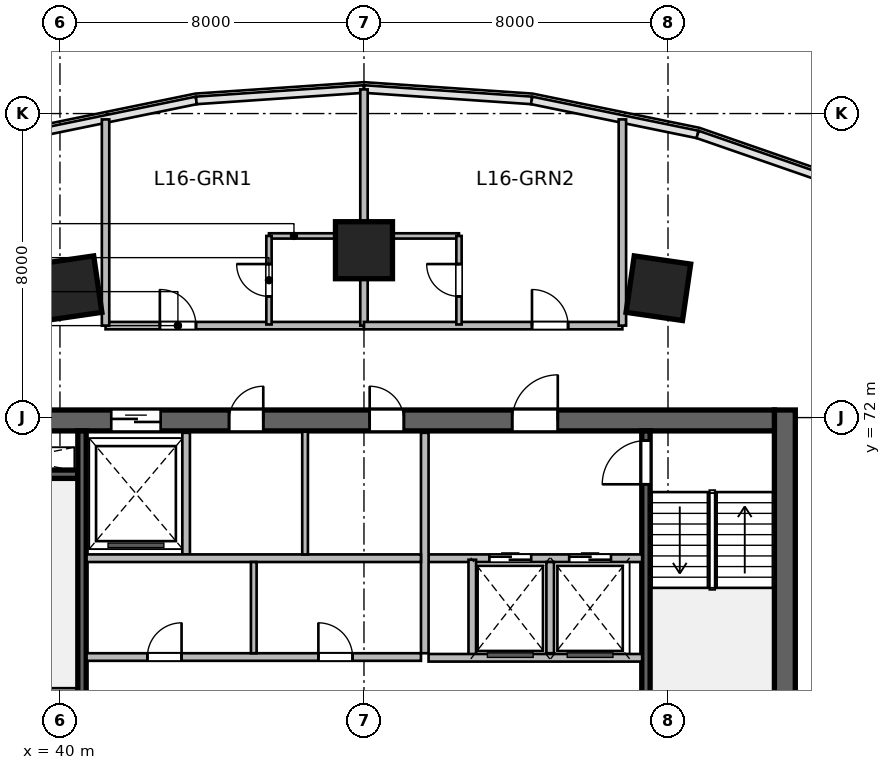
"""IFC4 building model, lengths in metres.
Left out: names, types, materials, properties, quantities, classifications, styles, units other than length and angle.
Written with IfcOpenShell. Run it as: python <this file> out.ifc"""

import sys

from ifc_helpers import new_model, si_unit, direction, frame, frame_2d, origin, origin_2d, place, context, subcontext, project, spatial, rectangle, extrude, source, transform, mapped, element, fill, save


model = new_model("IFC4")
c1 = context("Model", 3, precision=1e-05, world=origin(), true_north=direction((0.0, 1.0)))
c2 = subcontext(c1, "Body", "Model", "MODEL_VIEW")
j1 = project(units=[si_unit("LENGTHUNIT", "METRE"), si_unit("PLANEANGLEUNIT", "RADIAN")], contexts=[c1])
p1 = place(None, origin())
s1 = spatial("IfcSite", under=j1, at=p1, CompositionType="ELEMENT")
p2 = place(p1, origin())
s2 = spatial("IfcBuilding", under=s1, at=p2, CompositionType="ELEMENT")
p3 = place(p2, frame((0.0, 0.0, 71.4)))
s3 = spatial("IfcBuildingStorey", under=s2, at=p3, CompositionType="ELEMENT", Elevation=71.4)
m1 = source(origin(), c2, "Body", "SweptSolid", [
    extrude(rectangle(XDim=12.0, YDim=0.55, at=frame_2d((6.0, 0.0))), origin(), (0.0, 0.0, 1.0), 3.6),
])
p4 = place(p3, frame((59.075, 60.2, 0.0), z_axis=(0.0, 0.0, 1.0), x_axis=(0.0, 1.0, 0.0)))
e1 = element("IfcWall", 1, at=p4, inside=s3, PredefinedType="SHEAR", context=c2, shape_type="MappedRepresentation", body=[
    mapped(m1, transform((0.0, 0.0, 0.0), scale=1.0)),
])
m2 = source(origin(), c2, "Body", "SweptSolid", [
    extrude(rectangle(XDim=21.6, YDim=0.55, at=frame_2d((10.8, 0.0))), origin(), (0.0, 0.0, 1.0), 3.6),
])
p5 = place(p3, frame((37.2, 71.925, 0.0), z_axis=(0.0, 0.0, 1.0), x_axis=(1.0, 0.0, 0.0)))
e2 = element("IfcWall", 2, at=p5, inside=s3, PredefinedType="SHEAR", context=c2, shape_type="MappedRepresentation", body=[
    mapped(m2, transform((0.0, 0.0, 0.0), scale=1.0)),
])
p6 = place(p5, frame((1.2, 0.0, 0.0)))
e3 = element("IfcOpeningElement", 3, at=p6, cuts=e2, PredefinedType="OPENING", context=c2, shape_type="SweptSolid", body=[
    extrude(rectangle(XDim=0.9, YDim=2.1, at=frame_2d((0.45, 1.05))), frame((0.0, 0.285, 0.0), z_axis=(0.0, -1.0, 0.0), x_axis=(1.0, 0.0, 0.0)), (0.0, 0.0, 1.0), 0.57),
])
p7 = place(p5, frame((14.7, 0.0, 0.0)))
e4 = element("IfcOpeningElement", 4, at=p7, cuts=e2, PredefinedType="OPENING", context=c2, shape_type="SweptSolid", body=[
    extrude(rectangle(XDim=1.2, YDim=2.15, at=frame_2d((0.6, 1.075))), frame((0.0, 0.285, 0.0), z_axis=(0.0, -1.0, 0.0), x_axis=(1.0, 0.0, 0.0)), (0.0, 0.0, 1.0), 0.57),
])
p8 = place(p5, frame((4.15, 0.0, 0.0)))
e5 = element("IfcOpeningElement", 5, at=p8, cuts=e2, PredefinedType="OPENING", context=c2, shape_type="SweptSolid", body=[
    extrude(rectangle(XDim=1.3, YDim=2.15, at=frame_2d((0.65, 1.075))), frame((0.0, 0.285, 0.0), z_axis=(0.0, -1.0, 0.0), x_axis=(1.0, 0.0, 0.0)), (0.0, 0.0, 1.0), 0.57),
])
p9 = place(p5, frame((7.25, 0.0, 0.0)))
e6 = element("IfcOpeningElement", 6, at=p9, cuts=e2, PredefinedType="OPENING", context=c2, shape_type="SweptSolid", body=[
    extrude(rectangle(XDim=0.9, YDim=2.1, at=frame_2d((0.45, 1.05))), frame((0.0, 0.285, 0.0), z_axis=(0.0, -1.0, 0.0), x_axis=(1.0, 0.0, 0.0)), (0.0, 0.0, 1.0), 0.57),
])
p10 = place(p5, frame((10.95, 0.0, 0.0)))
e7 = element("IfcOpeningElement", 7, at=p10, cuts=e2, PredefinedType="OPENING", context=c2, shape_type="SweptSolid", body=[
    extrude(rectangle(XDim=0.9, YDim=2.1, at=frame_2d((0.45, 1.05))), frame((0.0, 0.285, 0.0), z_axis=(0.0, -1.0, 0.0), x_axis=(1.0, 0.0, 0.0)), (0.0, 0.0, 1.0), 0.57),
])
m3 = source(origin(), c2, "Body", "SweptSolid", [
    extrude(rectangle(XDim=3.27, YDim=0.22, at=frame_2d((1.635, 0.0))), origin(), (0.0, 0.0, 1.0), 3.6),
])
p11 = place(p3, frame((37.2, 70.51, 0.0), z_axis=(0.0, 0.0, 1.0), x_axis=(1.0, 0.0, 0.0)))
e8 = element("IfcWall", 8, at=p11, inside=s3, PredefinedType="SHEAR", context=c2, shape_type="MappedRepresentation", body=[
    mapped(m3, transform((0.0, 0.0, 0.0), scale=1.0)),
])
m4 = source(origin(), c2, "Body", "SweptSolid", [
    extrude(rectangle(XDim=10.9, YDim=0.22, at=frame_2d((5.45, 0.0))), origin(), (0.0, 0.0, 1.0), 3.6),
])
p12 = place(p3, frame((40.58, 60.75, 0.0), z_axis=(0.0, 0.0, 1.0), x_axis=(0.0, 1.0, 0.0)))
e9 = element("IfcWall", 9, at=p12, inside=s3, PredefinedType="SHEAR", context=c2, shape_type="MappedRepresentation", body=[
    mapped(m4, transform((0.0, 0.0, 0.0), scale=1.0)),
])
p13 = place(p3, frame((55.42, 60.75, 0.0), z_axis=(0.0, 0.0, 1.0), x_axis=(0.0, 1.0, 0.0)))
e10 = element("IfcWall", 10, at=p13, inside=s3, PredefinedType="SHEAR", context=c2, shape_type="MappedRepresentation", body=[
    mapped(m4, transform((0.0, 0.0, 0.0), scale=1.0)),
])
p14 = place(p13, frame((9.495, 0.0, 0.0)))
e11 = element("IfcOpeningElement", 11, at=p14, cuts=e10, PredefinedType="OPENING", context=c2, shape_type="SweptSolid", body=[
    extrude(rectangle(XDim=1.15, YDim=2.15, at=frame_2d((0.575, 1.075))), frame((0.0, 0.12, 0.0), z_axis=(0.0, -1.0, 0.0), x_axis=(1.0, 0.0, 0.0)), (0.0, 0.0, 1.0), 0.24),
])
m5 = source(origin(), c2, "Body", "SweptSolid", [
    extrude(rectangle(XDim=1.5, YDim=1.5, at=origin_2d()), origin(), (0.0, 0.0, 1.0), 3.6),
])
for number, where, z_axis, x_axis in (
    (12, (40.253, 75.404, 0.0), (0.0, 0.0, 1.0), (-0.143, 0.99, 0.0)),
    (13, (48.0, 76.404, 0.0), (0.0, 0.0, 1.0), (0.0, 1.0, 0.0)),
    (14, (55.747, 75.404, 0.0), (0.0, 0.0, 1.0), (0.143, 0.99, 0.0)),
):
    element("IfcColumn", number, at=place(p3, frame(where, z_axis=z_axis, x_axis=x_axis)), inside=s3, PredefinedType="COLUMN", context=c2, shape_type="MappedRepresentation", body=[
        mapped(m5, transform((0.0, 0.0, 0.0), scale=1.0)),
    ])
m6 = source(origin(), c2, "Body", "SweptSolid", [
    extrude(rectangle(XDim=5.62, YDim=0.2, at=frame_2d((2.81, 0.0))), origin(), (0.0, 0.0, 1.0), 3.36),
])
p15 = place(p3, frame((49.7, 68.3, 0.0), z_axis=(0.0, 0.0, 1.0), x_axis=(1.0, 0.0, 0.0)))
e15 = element("IfcWall", 15, at=p15, inside=s3, PredefinedType="SOLIDWALL", context=c2, shape_type="MappedRepresentation", body=[
    mapped(m6, transform((0.0, 0.0, 0.0), scale=1.0)),
])
p16 = place(p15, frame((1.6, 0.0, 0.0)))
e16 = element("IfcOpeningElement", 16, at=p16, cuts=e15, PredefinedType="OPENING", context=c2, shape_type="SweptSolid", body=[
    extrude(rectangle(XDim=1.1, YDim=2.15, at=frame_2d((0.55, 1.075))), frame((0.0, 0.11, 0.0), z_axis=(0.0, -1.0, 0.0), x_axis=(1.0, 0.0, 0.0)), (0.0, 0.0, 1.0), 0.22),
])
p17 = place(p15, frame((3.7, 0.0, 0.0)))
e17 = element("IfcOpeningElement", 17, at=p17, cuts=e15, PredefinedType="OPENING", context=c2, shape_type="SweptSolid", body=[
    extrude(rectangle(XDim=1.1, YDim=2.15, at=frame_2d((0.55, 1.075))), frame((0.0, 0.11, 0.0), z_axis=(0.0, -1.0, 0.0), x_axis=(1.0, 0.0, 0.0)), (0.0, 0.0, 1.0), 0.22),
])
m7 = source(origin(), c2, "Body", "SweptSolid", [
    extrude(rectangle(XDim=5.8, YDim=0.2, at=frame_2d((2.9, 0.0))), origin(), (0.0, 0.0, 1.0), 3.36),
])
p18 = place(p3, frame((49.6, 65.8, 0.0), z_axis=(0.0, 0.0, 1.0), x_axis=(0.0, 1.0, 0.0)))
e18 = element("IfcWall", 18, at=p18, inside=s3, PredefinedType="SOLIDWALL", context=c2, shape_type="MappedRepresentation", body=[
    mapped(m7, transform((0.0, 0.0, 0.0), scale=1.0)),
])
m8 = source(origin(), c2, "Body", "SweptSolid", [
    extrude(rectangle(XDim=2.58, YDim=0.2, at=frame_2d((1.29, 0.0))), origin(), (0.0, 0.0, 1.0), 3.36),
])
p19 = place(p3, frame((50.85, 65.68, 0.0), z_axis=(0.0, 0.0, 1.0), x_axis=(0.0, 1.0, 0.0)))
e19 = element("IfcWall", 19, at=p19, inside=s3, PredefinedType="SOLIDWALL", context=c2, shape_type="MappedRepresentation", body=[
    mapped(m8, transform((0.0, 0.0, 0.0), scale=1.0)),
])
m9 = source(origin(), c2, "Body", "SweptSolid", [
    extrude(rectangle(XDim=2.4, YDim=0.2, at=frame_2d((1.2, 0.0))), origin(), (0.0, 0.0, 1.0), 3.36),
])
p20 = place(p3, frame((52.9, 65.8, 0.0), z_axis=(0.0, 0.0, 1.0), x_axis=(0.0, 1.0, 0.0)))
e20 = element("IfcWall", 20, at=p20, inside=s3, PredefinedType="SOLIDWALL", context=c2, shape_type="MappedRepresentation", body=[
    mapped(m9, transform((0.0, 0.0, 0.0), scale=1.0)),
])
p21 = place(p3, frame((49.7, 65.68, 0.0), z_axis=(0.0, 0.0, 1.0), x_axis=(1.0, 0.0, 0.0)))
e21 = element("IfcWall", 21, at=p21, inside=s3, PredefinedType="SOLIDWALL", context=c2, shape_type="MappedRepresentation", body=[
    mapped(m6, transform((0.0, 0.0, 0.0), scale=1.0)),
])
m10 = source(origin(), c2, "Body", "SweptSolid", [
    extrude(rectangle(XDim=3.2, YDim=0.2, at=frame_2d((1.6, 0.0))), origin(), (0.0, 0.0, 1.0), 3.36),
])
p22 = place(p3, frame((43.32, 68.4, 0.0), z_axis=(0.0, 0.0, 1.0), x_axis=(0.0, 1.0, 0.0)))
e22 = element("IfcWall", 22, at=p22, inside=s3, PredefinedType="SOLIDWALL", context=c2, shape_type="MappedRepresentation", body=[
    mapped(m10, transform((0.0, 0.0, 0.0), scale=1.0)),
])
m11 = source(origin(), c2, "Body", "SweptSolid", [
    extrude(rectangle(XDim=8.8, YDim=0.2, at=frame_2d((4.4, 0.0))), origin(), (0.0, 0.0, 1.0), 3.36),
])
p23 = place(p3, frame((40.7, 68.3, 0.0), z_axis=(0.0, 0.0, 1.0), x_axis=(1.0, 0.0, 0.0)))
e23 = element("IfcWall", 23, at=p23, inside=s3, PredefinedType="SOLIDWALL", context=c2, shape_type="MappedRepresentation", body=[
    mapped(m11, transform((0.0, 0.0, 0.0), scale=1.0)),
])
m12 = source(origin(), c2, "Body", "SweptSolid", [
    extrude(rectangle(XDim=3.23, YDim=0.15, at=frame_2d((1.615, 0.0))), origin(), (0.0, 0.0, 1.0), 3.36),
])
p24 = place(p3, frame((46.45, 68.4, 0.0), z_axis=(0.0, 0.0, 1.0), x_axis=(0.0, 1.0, 0.0)))
e24 = element("IfcWall", 24, at=p24, inside=s3, PredefinedType="PARTITIONING", context=c2, shape_type="MappedRepresentation", body=[
    mapped(m12, transform((0.0, 0.0, 0.0), scale=1.0)),
])
p25 = place(p3, frame((40.7, 65.7, 0.0), z_axis=(0.0, 0.0, 1.0), x_axis=(1.0, 0.0, 0.0)))
e25 = element("IfcWall", 25, at=p25, inside=s3, PredefinedType="SOLIDWALL", context=c2, shape_type="MappedRepresentation", body=[
    mapped(m11, transform((0.0, 0.0, 0.0), scale=1.0)),
])
p26 = place(p25, frame((1.6, 0.0, 0.0)))
e26 = element("IfcOpeningElement", 26, at=p26, cuts=e25, PredefinedType="OPENING", context=c2, shape_type="SweptSolid", body=[
    extrude(rectangle(XDim=0.9, YDim=2.1, at=frame_2d((0.45, 1.05))), frame((0.0, 0.11, 0.0), z_axis=(0.0, -1.0, 0.0), x_axis=(1.0, 0.0, 0.0)), (0.0, 0.0, 1.0), 0.22),
])
p27 = place(p25, frame((6.1, 0.0, 0.0)))
e27 = element("IfcOpeningElement", 27, at=p27, cuts=e25, PredefinedType="OPENING", context=c2, shape_type="SweptSolid", body=[
    extrude(rectangle(XDim=0.9, YDim=2.1, at=frame_2d((0.45, 1.05))), frame((0.0, 0.11, 0.0), z_axis=(0.0, -1.0, 0.0), x_axis=(1.0, 0.0, 0.0)), (0.0, 0.0, 1.0), 0.22),
])
m13 = source(origin(), c2, "Body", "SweptSolid", [
    extrude(rectangle(XDim=2.4, YDim=0.15, at=frame_2d((1.2, 0.0))), origin(), (0.0, 0.0, 1.0), 3.36),
])
p28 = place(p3, frame((45.1, 65.8, 0.0), z_axis=(0.0, 0.0, 1.0), x_axis=(0.0, 1.0, 0.0)))
e28 = element("IfcWall", 28, at=p28, inside=s3, PredefinedType="PARTITIONING", context=c2, shape_type="MappedRepresentation", body=[
    mapped(m13, transform((0.0, 0.0, 0.0), scale=1.0)),
])
m14 = source(origin(), c2, "Body", "SweptSolid", [
    extrude(rectangle(XDim=6.8, YDim=0.195, at=frame_2d((3.4, 0.0))), origin(), (0.0, 0.0, 1.0), 3.36),
])
p29 = place(p3, frame((41.2, 74.42, 0.0), z_axis=(0.0, 0.0, 1.0), x_axis=(1.0, 0.0, 0.0)))
e29 = element("IfcWall", 29, at=p29, inside=s3, PredefinedType="PARTITIONING", context=c2, shape_type="MappedRepresentation", body=[
    mapped(m14, transform((0.0, 0.0, 0.0), scale=1.0)),
])
p30 = place(p29, frame((1.429, 0.0, 0.0)))
e30 = element("IfcOpeningElement", 30, at=p30, cuts=e29, PredefinedType="OPENING", context=c2, shape_type="SweptSolid", body=[
    extrude(rectangle(XDim=0.95, YDim=2.15, at=frame_2d((0.475, 1.075))), frame((0.0, 0.107, 0.0), z_axis=(0.0, -1.0, 0.0), x_axis=(1.0, 0.0, 0.0)), (0.0, 0.0, 1.0), 0.215),
])
m15 = source(origin(), c2, "Body", "SweptSolid", [
    extrude(rectangle(XDim=6.216, YDim=0.195, at=frame_2d((3.108, 0.0))), origin(), (0.0, 0.0, 1.0), 2.644),
])
p31 = place(p3, frame((48.0, 74.42, 0.0), z_axis=(0.0, 0.0, 1.0), x_axis=(0.0, 1.0, 0.0)))
e31 = element("IfcWall", 31, at=p31, inside=s3, PredefinedType="PARTITIONING", context=c2, shape_type="MappedRepresentation", body=[
    mapped(m15, transform((0.0, 0.0, 0.0), scale=1.0)),
])
m16 = source(origin(), c2, "Body", "SweptSolid", [
    extrude(rectangle(XDim=5.426, YDim=0.195, at=frame_2d((2.713, 0.0))), origin(), (0.0, 0.0, 1.0), 3.36),
])
p32 = place(p3, frame((41.2, 74.42, 0.0), z_axis=(0.0, 0.0, 1.0), x_axis=(0.0, 1.0, 0.0)))
e32 = element("IfcWall", 32, at=p32, inside=s3, PredefinedType="PARTITIONING", context=c2, shape_type="MappedRepresentation", body=[
    mapped(m16, transform((0.0, 0.0, 0.0), scale=1.0)),
])
m17 = source(origin(), c2, "Body", "SweptSolid", [
    extrude(rectangle(XDim=2.35, YDim=0.14, at=frame_2d((1.175, 0.0))), origin(), (0.0, 0.0, 1.0), 3.36),
])
p33 = place(p3, frame((45.5, 76.78, 0.0), z_axis=(0.0, 0.0, 1.0), x_axis=(1.0, 0.0, 0.0)))
e33 = element("IfcWall", 33, at=p33, inside=s3, PredefinedType="PARTITIONING", context=c2, shape_type="MappedRepresentation", body=[
    mapped(m17, transform((0.0, 0.0, 0.0), scale=1.0)),
])
m18 = source(origin(), c2, "Body", "SweptSolid", [
    extrude(rectangle(XDim=2.33, YDim=0.14, at=frame_2d((1.165, 0.0))), origin(), (0.0, 0.0, 1.0), 3.36),
])
p34 = place(p3, frame((45.5, 74.45, 0.0), z_axis=(0.0, 0.0, 1.0), x_axis=(0.0, 1.0, 0.0)))
e34 = element("IfcWall", 34, at=p34, inside=s3, PredefinedType="PARTITIONING", context=c2, shape_type="MappedRepresentation", body=[
    mapped(m18, transform((0.0, 0.0, 0.0), scale=1.0)),
])
p35 = place(p34, frame((0.74, 0.0, 0.0)))
e35 = element("IfcOpeningElement", 35, at=p35, cuts=e34, PredefinedType="OPENING", context=c2, shape_type="SweptSolid", body=[
    extrude(rectangle(XDim=0.85, YDim=2.05, at=frame_2d((0.425, 1.025))), frame((0.0, 0.08, 0.0), z_axis=(0.0, -1.0, 0.0), x_axis=(1.0, 0.0, 0.0)), (0.0, 0.0, 1.0), 0.16),
])
p36 = place(p3, frame((48.0, 74.42, 0.0), z_axis=(0.0, 0.0, 1.0), x_axis=(1.0, 0.0, 0.0)))
e36 = element("IfcWall", 36, at=p36, inside=s3, PredefinedType="PARTITIONING", context=c2, shape_type="MappedRepresentation", body=[
    mapped(m14, transform((0.0, 0.0, 0.0), scale=1.0)),
])
p37 = place(p36, frame((4.421, 0.0, 0.0)))
e37 = element("IfcOpeningElement", 37, at=p37, cuts=e36, PredefinedType="OPENING", context=c2, shape_type="SweptSolid", body=[
    extrude(rectangle(XDim=0.95, YDim=2.15, at=frame_2d((0.475, 1.075))), frame((0.0, 0.107, 0.0), z_axis=(0.0, -1.0, 0.0), x_axis=(1.0, 0.0, 0.0)), (0.0, 0.0, 1.0), 0.215),
])
p38 = place(p3, frame((54.8, 74.42, 0.0), z_axis=(0.0, 0.0, 1.0), x_axis=(0.0, 1.0, 0.0)))
e38 = element("IfcWall", 38, at=p38, inside=s3, PredefinedType="PARTITIONING", context=c2, shape_type="MappedRepresentation", body=[
    mapped(m16, transform((0.0, 0.0, 0.0), scale=1.0)),
])
p39 = place(p3, frame((48.15, 76.78, 0.0), z_axis=(0.0, 0.0, 1.0), x_axis=(1.0, 0.0, 0.0)))
e39 = element("IfcWall", 39, at=p39, inside=s3, PredefinedType="PARTITIONING", context=c2, shape_type="MappedRepresentation", body=[
    mapped(m17, transform((0.0, 0.0, 0.0), scale=1.0)),
])
p40 = place(p3, frame((50.5, 74.45, 0.0), z_axis=(0.0, 0.0, 1.0), x_axis=(0.0, 1.0, 0.0)))
e40 = element("IfcWall", 40, at=p40, inside=s3, PredefinedType="PARTITIONING", context=c2, shape_type="MappedRepresentation", body=[
    mapped(m18, transform((0.0, 0.0, 0.0), scale=1.0)),
])
p41 = place(p40, frame((0.74, 0.0, 0.0)))
e41 = element("IfcOpeningElement", 41, at=p41, cuts=e40, PredefinedType="OPENING", context=c2, shape_type="SweptSolid", body=[
    extrude(rectangle(XDim=0.85, YDim=2.05, at=frame_2d((0.425, 1.025))), frame((0.0, 0.08, 0.0), z_axis=(0.0, -1.0, 0.0), x_axis=(1.0, 0.0, 0.0)), (0.0, 0.0, 1.0), 0.16),
])
m19 = source(origin(), c2, "Body", "SweptSolid", [
    extrude(rectangle(XDim=1.15, YDim=2.15, at=frame_2d((0.575, 1.075))), frame((0.0, 0.025, 0.0), z_axis=(0.0, -1.0, 0.0), x_axis=(1.0, 0.0, 0.0)), (0.0, 0.0, 1.0), 0.05),
])
p42 = place(p14, origin())
e42 = element("IfcDoor", 42, at=p42, inside=s3, OperationType="SINGLE_SWING_LEFT", PredefinedType="DOOR", context=c2, shape_type="MappedRepresentation", body=[
    mapped(m19, transform((0.0, 0.0, 0.0), scale=1.0)),
])
fill(e11, e42)
m20 = source(origin(), c2, "Body", "SweptSolid", [
    extrude(rectangle(XDim=1.2, YDim=2.15, at=frame_2d((0.6, 1.075))), frame((0.0, 0.025, 0.0), z_axis=(0.0, -1.0, 0.0), x_axis=(1.0, 0.0, 0.0)), (0.0, 0.0, 1.0), 0.05),
])
p43 = place(p7, origin())
e43 = element("IfcDoor", 43, at=p43, inside=s3, OperationType="SINGLE_SWING_RIGHT", PredefinedType="DOOR", context=c2, shape_type="MappedRepresentation", body=[
    mapped(m20, transform((0.0, 0.0, 0.0), scale=1.0)),
])
fill(e4, e43)
m21 = source(origin(), c2, "Body", "SweptSolid", [
    extrude(rectangle(XDim=1.1, YDim=2.15, at=frame_2d((0.55, 1.075))), frame((0.0, 0.025, 0.0), z_axis=(0.0, -1.0, 0.0), x_axis=(1.0, 0.0, 0.0)), (0.0, 0.0, 1.0), 0.05),
])
p44 = place(p16, origin())
e44 = element("IfcDoor", 44, at=p44, inside=s3, OperationType="DOUBLE_DOOR_SLIDING", PredefinedType="DOOR", context=c2, shape_type="MappedRepresentation", body=[
    mapped(m21, transform((0.0, 0.0, 0.0), scale=1.0)),
])
fill(e16, e44)
p45 = place(p17, origin())
e45 = element("IfcDoor", 45, at=p45, inside=s3, OperationType="DOUBLE_DOOR_SLIDING", PredefinedType="DOOR", context=c2, shape_type="MappedRepresentation", body=[
    mapped(m21, transform((0.0, 0.0, 0.0), scale=1.0)),
])
fill(e17, e45)
m22 = source(origin(), c2, "Body", "SweptSolid", [
    extrude(rectangle(XDim=1.3, YDim=2.15, at=frame_2d((0.65, 1.075))), frame((0.0, 0.025, 0.0), z_axis=(0.0, -1.0, 0.0), x_axis=(1.0, 0.0, 0.0)), (0.0, 0.0, 1.0), 0.05),
])
p46 = place(p8, origin())
e46 = element("IfcDoor", 46, at=p46, inside=s3, OperationType="DOUBLE_DOOR_SLIDING", PredefinedType="DOOR", context=c2, shape_type="MappedRepresentation", body=[
    mapped(m22, transform((0.0, 0.0, 0.0), scale=1.0)),
])
fill(e5, e46)
m23 = source(origin(), c2, "Body", "SweptSolid", [
    extrude(rectangle(XDim=0.9, YDim=2.1, at=frame_2d((0.45, 1.05))), frame((0.0, 0.025, 0.0), z_axis=(0.0, -1.0, 0.0), x_axis=(1.0, 0.0, 0.0)), (0.0, 0.0, 1.0), 0.05),
])
p47 = place(p9, origin())
e47 = element("IfcDoor", 47, at=p47, inside=s3, OperationType="SINGLE_SWING_RIGHT", PredefinedType="DOOR", context=c2, shape_type="MappedRepresentation", body=[
    mapped(m23, transform((0.0, 0.0, 0.0), scale=1.0)),
])
fill(e6, e47)
p48 = place(p10, origin())
e48 = element("IfcDoor", 48, at=p48, inside=s3, OperationType="SINGLE_SWING_LEFT", PredefinedType="DOOR", context=c2, shape_type="MappedRepresentation", body=[
    mapped(m23, transform((0.0, 0.0, 0.0), scale=1.0)),
])
fill(e7, e48)
p49 = place(p26, origin())
e49 = element("IfcDoor", 49, at=p49, inside=s3, OperationType="SINGLE_SWING_RIGHT", PredefinedType="DOOR", context=c2, shape_type="MappedRepresentation", body=[
    mapped(m23, transform((0.0, 0.0, 0.0), scale=1.0)),
])
fill(e26, e49)
p50 = place(p27, origin())
e50 = element("IfcDoor", 50, at=p50, inside=s3, OperationType="SINGLE_SWING_LEFT", PredefinedType="DOOR", context=c2, shape_type="MappedRepresentation", body=[
    mapped(m23, transform((0.0, 0.0, 0.0), scale=1.0)),
])
fill(e27, e50)
m24 = source(origin(), c2, "Body", "SweptSolid", [
    extrude(rectangle(XDim=0.95, YDim=2.15, at=frame_2d((0.475, 1.075))), frame((0.0, 0.025, 0.0), z_axis=(0.0, -1.0, 0.0), x_axis=(1.0, 0.0, 0.0)), (0.0, 0.0, 1.0), 0.05),
])
p51 = place(p30, origin())
e51 = element("IfcDoor", 51, at=p51, inside=s3, OperationType="SINGLE_SWING_LEFT", PredefinedType="DOOR", context=c2, shape_type="MappedRepresentation", body=[
    mapped(m24, transform((0.0, 0.0, 0.0), scale=1.0)),
])
fill(e30, e51)
m25 = source(origin(), c2, "Body", "SweptSolid", [
    extrude(rectangle(XDim=0.85, YDim=2.05, at=frame_2d((0.425, 1.025))), frame((0.0, 0.025, 0.0), z_axis=(0.0, -1.0, 0.0), x_axis=(1.0, 0.0, 0.0)), (0.0, 0.0, 1.0), 0.05),
])
p52 = place(p35, origin())
e52 = element("IfcDoor", 52, at=p52, inside=s3, OperationType="SINGLE_SWING_RIGHT", PredefinedType="DOOR", context=c2, shape_type="MappedRepresentation", body=[
    mapped(m25, transform((0.0, 0.0, 0.0), scale=1.0)),
])
fill(e35, e52)
p53 = place(p37, origin())
e53 = element("IfcDoor", 53, at=p53, inside=s3, OperationType="SINGLE_SWING_LEFT", PredefinedType="DOOR", context=c2, shape_type="MappedRepresentation", body=[
    mapped(m24, transform((0.0, 0.0, 0.0), scale=1.0)),
])
fill(e37, e53)
p54 = place(p41, origin())
e54 = element("IfcDoor", 54, at=p54, inside=s3, OperationType="SINGLE_SWING_RIGHT", PredefinedType="DOOR", context=c2, shape_type="MappedRepresentation", body=[
    mapped(m25, transform((0.0, 0.0, 0.0), scale=1.0)),
])
fill(e41, e54)
save(model, sys.argv[1])
